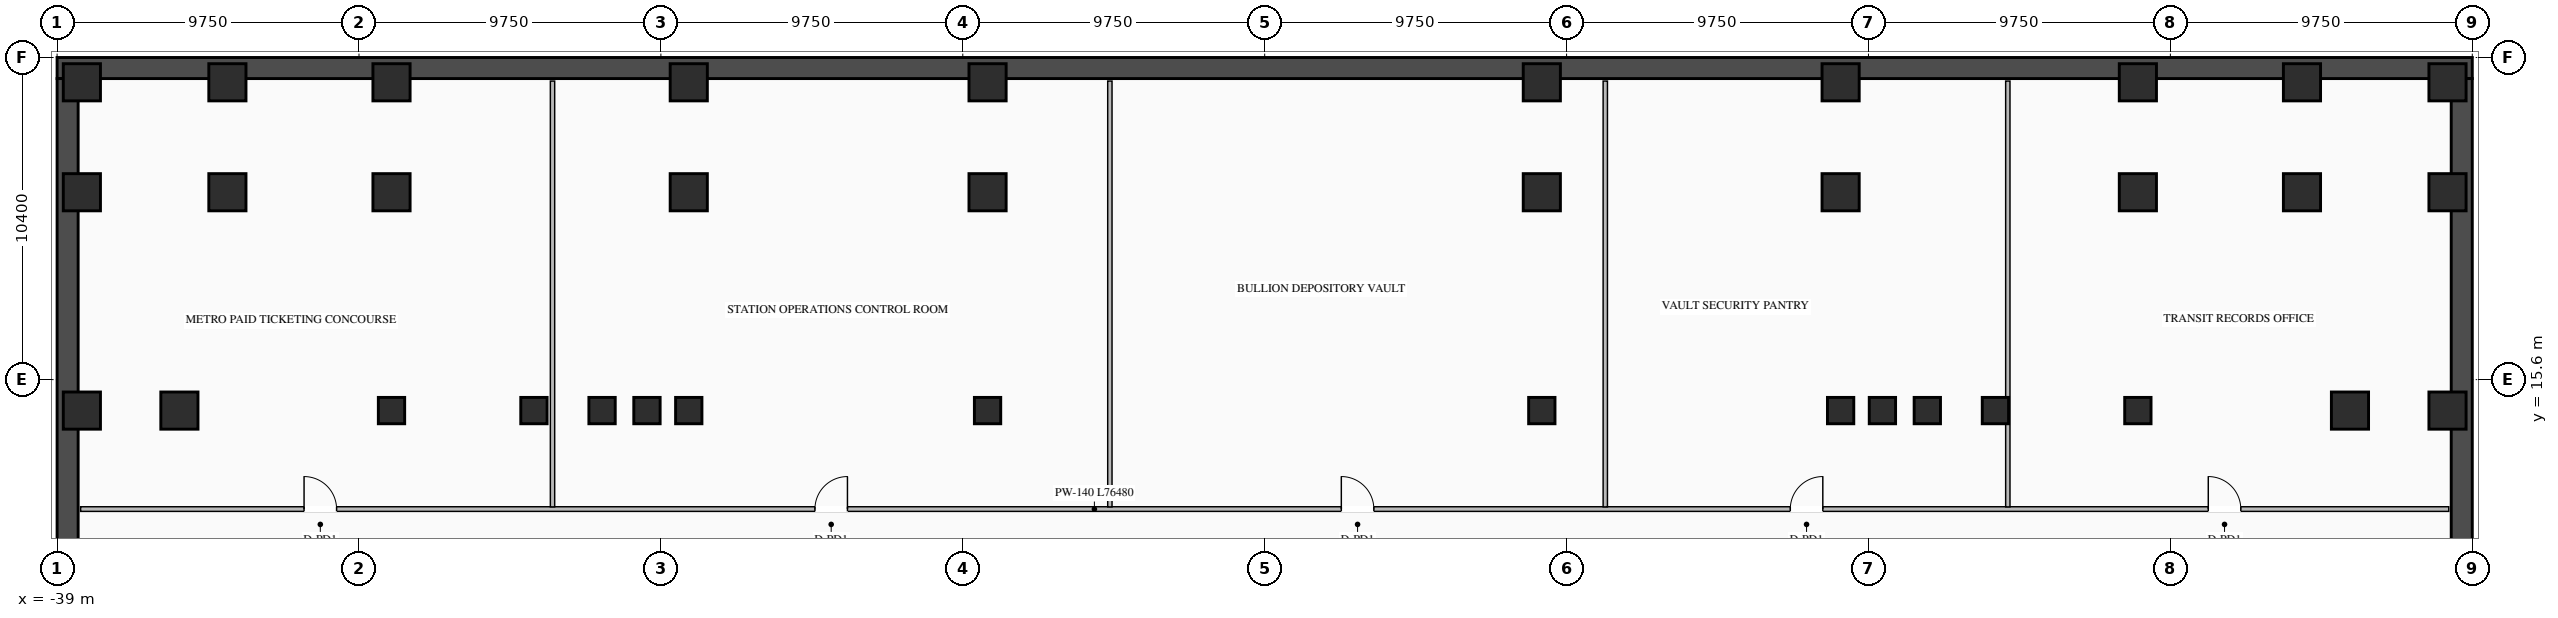
"""IFC4 building model, lengths in metres.
Left out: names, types, materials, properties, quantities, classifications, styles, units other than length and angle.
Written with IfcOpenShell. Run it as: python <this file> out.ifc"""

import sys

from ifc_helpers import new_model, si_unit, direction, frame, frame_2d, origin, origin_2d, place, context, subcontext, project, spatial, rectangle, i_section, extrude, element, fill, save


model = new_model("IFC4")
c1 = context("Model", 3, precision=1e-05, world=origin(), true_north=direction((0.0, 1.0)))
c2 = subcontext(c1, "Body", "Model", "MODEL_VIEW")
j1 = project(units=[si_unit("LENGTHUNIT", "METRE"), si_unit("PLANEANGLEUNIT", "RADIAN")], contexts=[c1])
p1 = place(None, origin())
s1 = spatial("IfcSite", under=j1, at=p1, CompositionType="ELEMENT")
p2 = place(p1, origin())
s2 = spatial("IfcBuilding", under=s1, at=p2, CompositionType="ELEMENT")
p3 = place(p2, frame((0.0, 0.0, -4.8)))
s3 = spatial("IfcBuildingStorey", under=s2, at=p3, CompositionType="ELEMENT", Elevation=-4.8)
p4 = place(p3, frame((39.0, 25.66, 0.0), z_axis=(0.0, 0.0, 1.0), x_axis=(-1.0, 0.0, 0.0)))
e1 = element("IfcWall", 1, at=p4, inside=s3, PredefinedType="SOLIDWALL", context=c2, shape_type="SweptSolid", body=[
    extrude(rectangle(XDim=78.0, YDim=0.68, at=frame_2d((39.0, 0.0))), origin(), (0.0, 0.0, 1.0), 4.45),
])
for number, where, z_axis, x_axis in (
    (2, (-38.66, -25.32, 0.0), (0.0, 0.0, 1.0), (0.0, 1.0, 0.0)),
    (3, (38.66, 25.32, 0.0), (0.0, 0.0, 1.0), (0.0, -1.0, 0.0)),
):
    element("IfcWall", number, at=place(p3, frame(where, z_axis=z_axis, x_axis=x_axis)), inside=s3, PredefinedType="SOLIDWALL", context=c2, shape_type="SweptSolid", body=[
        extrude(rectangle(XDim=50.64, YDim=0.68, at=frame_2d((25.32, 0.0))), origin(), (0.0, 0.0, 1.0), 4.45),
    ])
for number, where, z_axis, x_axis in (
    (4, (-21.4, 14.6, 0.0), (0.0, 0.0, 1.0), (1.0, 0.0, 0.0)),
    (5, (-19.95, 14.6, 0.0), (0.0, 0.0, 1.0), (1.0, 0.0, 0.0)),
    (6, (-18.6, 14.6, 0.0), (0.0, 0.0, 1.0), (1.0, 0.0, 0.0)),
    (7, (-8.95, 14.6, 0.0), (0.0, 0.0, 1.0), (1.0, 0.0, 0.0)),
    (8, (8.95, 14.6, 0.0), (0.0, 0.0, 1.0), (1.0, 0.0, 0.0)),
    (9, (18.6, 14.6, 0.0), (0.0, 0.0, 1.0), (1.0, 0.0, 0.0)),
    (10, (19.95, 14.6, 0.0), (0.0, 0.0, 1.0), (1.0, 0.0, 0.0)),
    (11, (21.4, 14.6, 0.0), (0.0, 0.0, 1.0), (1.0, 0.0, 0.0)),
    (12, (-23.6, 14.6, 0.0), (0.0, 0.0, 1.0), (1.0, 0.0, 0.0)),
    (13, (23.6, 14.6, 0.0), (0.0, 0.0, 1.0), (1.0, 0.0, 0.0)),
    (14, (-28.2, 14.6, 0.0), (0.0, 0.0, 1.0), (1.0, 0.0, 0.0)),
    (15, (28.2, 14.6, 0.0), (0.0, 0.0, 1.0), (1.0, 0.0, 0.0)),
):
    element("IfcColumn", number, at=place(p3, frame(where, z_axis=z_axis, x_axis=x_axis)), inside=s3, PredefinedType="COLUMN", context=c2, shape_type="SweptSolid", body=[
        extrude(i_section(OverallWidth=0.85, OverallDepth=0.85, WebThickness=0.032, FlangeThickness=0.048, at=origin_2d()), origin(), (0.0, 0.0, 1.0), 4.8),
    ])
for number, where, z_axis, x_axis in (
    (16, (-35.05, 14.6, 0.0), (0.0, 0.0, 1.0), (1.0, 0.0, 0.0)),
    (17, (35.05, 14.6, 0.0), (0.0, 0.0, 1.0), (1.0, 0.0, 0.0)),
    (18, (-38.2, 21.65, 0.0), (0.0, 0.0, 1.0), (1.0, 0.0, 0.0)),
    (19, (-33.5, 21.65, 0.0), (0.0, 0.0, 1.0), (1.0, 0.0, 0.0)),
    (20, (-28.2, 21.65, 0.0), (0.0, 0.0, 1.0), (1.0, 0.0, 0.0)),
    (21, (-18.6, 21.65, 0.0), (0.0, 0.0, 1.0), (1.0, 0.0, 0.0)),
    (22, (-8.95, 21.65, 0.0), (0.0, 0.0, 1.0), (1.0, 0.0, 0.0)),
    (23, (8.95, 21.65, 0.0), (0.0, 0.0, 1.0), (1.0, 0.0, 0.0)),
    (24, (18.6, 21.65, 0.0), (0.0, 0.0, 1.0), (1.0, 0.0, 0.0)),
    (25, (28.2, 21.65, 0.0), (0.0, 0.0, 1.0), (1.0, 0.0, 0.0)),
    (26, (33.5, 21.65, 0.0), (0.0, 0.0, 1.0), (1.0, 0.0, 0.0)),
    (27, (38.2, 21.65, 0.0), (0.0, 0.0, 1.0), (1.0, 0.0, 0.0)),
    (28, (-38.2, 25.2, 0.0), (0.0, 0.0, 1.0), (1.0, 0.0, 0.0)),
    (29, (-33.5, 25.2, 0.0), (0.0, 0.0, 1.0), (1.0, 0.0, 0.0)),
    (30, (-28.2, 25.2, 0.0), (0.0, 0.0, 1.0), (1.0, 0.0, 0.0)),
    (31, (-18.6, 25.2, 0.0), (0.0, 0.0, 1.0), (1.0, 0.0, 0.0)),
    (32, (-8.95, 25.2, 0.0), (0.0, 0.0, 1.0), (1.0, 0.0, 0.0)),
    (33, (8.95, 25.2, 0.0), (0.0, 0.0, 1.0), (1.0, 0.0, 0.0)),
    (34, (18.6, 25.2, 0.0), (0.0, 0.0, 1.0), (1.0, 0.0, 0.0)),
    (35, (28.2, 25.2, 0.0), (0.0, 0.0, 1.0), (1.0, 0.0, 0.0)),
    (36, (33.5, 25.2, 0.0), (0.0, 0.0, 1.0), (1.0, 0.0, 0.0)),
    (37, (38.2, 25.2, 0.0), (0.0, 0.0, 1.0), (1.0, 0.0, 0.0)),
    (38, (-38.2, 14.6, 0.0), (0.0, 0.0, 1.0), (1.0, 0.0, 0.0)),
    (39, (38.2, 14.6, 0.0), (0.0, 0.0, 1.0), (1.0, 0.0, 0.0)),
):
    element("IfcColumn", number, at=place(p3, frame(where, z_axis=z_axis, x_axis=x_axis)), inside=s3, PredefinedType="COLUMN", context=c2, shape_type="SweptSolid", body=[
        extrude(rectangle(XDim=1.2, YDim=1.2, at=origin_2d()), origin(), (0.0, 0.0, 1.0), 4.8),
    ])
p5 = place(p3, frame((-38.24, 11.42, 0.0), z_axis=(0.0, 0.0, 1.0), x_axis=(1.0, 0.0, 0.0)))
e40 = element("IfcWall", 40, at=p5, inside=s3, PredefinedType="STANDARD", context=c2, shape_type="SweptSolid", body=[
    extrude(rectangle(XDim=76.48, YDim=0.15, at=frame_2d((38.24, 0.0))), origin(), (0.0, 0.0, 1.0), 4.43),
])
p6 = place(p5, frame((7.216, 0.0, 0.0)))
e41 = element("IfcOpeningElement", 41, at=p6, cuts=e40, PredefinedType="OPENING", context=c2, shape_type="SweptSolid", body=[
    extrude(rectangle(XDim=1.05, YDim=2.08, at=frame_2d((0.525, 1.04))), frame((0.0, 0.085, 0.0), z_axis=(0.0, -1.0, 0.0), x_axis=(1.0, 0.0, 0.0)), (0.0, 0.0, 1.0), 0.17),
])
p7 = place(p5, frame((23.715, 0.0, 0.0)))
e42 = element("IfcOpeningElement", 42, at=p7, cuts=e40, PredefinedType="OPENING", context=c2, shape_type="SweptSolid", body=[
    extrude(rectangle(XDim=1.05, YDim=2.08, at=frame_2d((0.525, 1.04))), frame((0.0, 0.085, 0.0), z_axis=(0.0, -1.0, 0.0), x_axis=(1.0, 0.0, 0.0)), (0.0, 0.0, 1.0), 0.17),
])
p8 = place(p5, frame((40.715, 0.0, 0.0)))
e43 = element("IfcOpeningElement", 43, at=p8, cuts=e40, PredefinedType="OPENING", context=c2, shape_type="SweptSolid", body=[
    extrude(rectangle(XDim=1.05, YDim=2.08, at=frame_2d((0.525, 1.04))), frame((0.0, 0.085, 0.0), z_axis=(0.0, -1.0, 0.0), x_axis=(1.0, 0.0, 0.0)), (0.0, 0.0, 1.0), 0.17),
])
p9 = place(p5, frame((55.215, 0.0, 0.0)))
e44 = element("IfcOpeningElement", 44, at=p9, cuts=e40, PredefinedType="OPENING", context=c2, shape_type="SweptSolid", body=[
    extrude(rectangle(XDim=1.05, YDim=2.08, at=frame_2d((0.525, 1.04))), frame((0.0, 0.085, 0.0), z_axis=(0.0, -1.0, 0.0), x_axis=(1.0, 0.0, 0.0)), (0.0, 0.0, 1.0), 0.17),
])
p10 = place(p5, frame((68.714, 0.0, 0.0)))
e45 = element("IfcOpeningElement", 45, at=p10, cuts=e40, PredefinedType="OPENING", context=c2, shape_type="SweptSolid", body=[
    extrude(rectangle(XDim=1.05, YDim=2.08, at=frame_2d((0.525, 1.04))), frame((0.0, 0.085, 0.0), z_axis=(0.0, -1.0, 0.0), x_axis=(1.0, 0.0, 0.0)), (0.0, 0.0, 1.0), 0.17),
])
for number, where, z_axis, x_axis in (
    (46, (-23.0, 11.49, 0.0), (0.0, 0.0, 1.0), (0.0, 1.0, 0.0)),
    (47, (-5.0, 11.49, 0.0), (0.0, 0.0, 1.0), (0.0, 1.0, 0.0)),
    (48, (11.0, 11.49, 0.0), (0.0, 0.0, 1.0), (0.0, 1.0, 0.0)),
    (49, (24.0, 11.49, 0.0), (0.0, 0.0, 1.0), (0.0, 1.0, 0.0)),
):
    element("IfcWall", number, at=place(p3, frame(where, z_axis=z_axis, x_axis=x_axis)), inside=s3, PredefinedType="STANDARD", context=c2, shape_type="SweptSolid", body=[
        extrude(rectangle(XDim=13.75, YDim=0.14, at=frame_2d((6.875, 0.0))), origin(), (0.0, 0.0, 1.0), 4.43),
    ])
p11 = place(p6, origin())
e50 = element("IfcDoor", 50, at=p11, inside=s3, OperationType="SINGLE_SWING_LEFT", PredefinedType="DOOR", context=c2, shape_type="SweptSolid", body=[
    extrude(rectangle(XDim=1.05, YDim=2.08, at=frame_2d((0.525, 1.04))), frame((0.0, 0.025, 0.0), z_axis=(0.0, -1.0, 0.0), x_axis=(1.0, 0.0, 0.0)), (0.0, 0.0, 1.0), 0.05),
])
fill(e41, e50)
p12 = place(p7, origin())
e51 = element("IfcDoor", 51, at=p12, inside=s3, OperationType="SINGLE_SWING_RIGHT", PredefinedType="DOOR", context=c2, shape_type="SweptSolid", body=[
    extrude(rectangle(XDim=1.05, YDim=2.08, at=frame_2d((0.525, 1.04))), frame((0.0, 0.025, 0.0), z_axis=(0.0, -1.0, 0.0), x_axis=(1.0, 0.0, 0.0)), (0.0, 0.0, 1.0), 0.05),
])
fill(e42, e51)
p13 = place(p8, origin())
e52 = element("IfcDoor", 52, at=p13, inside=s3, OperationType="SINGLE_SWING_LEFT", PredefinedType="DOOR", context=c2, shape_type="SweptSolid", body=[
    extrude(rectangle(XDim=1.05, YDim=2.08, at=frame_2d((0.525, 1.04))), frame((0.0, 0.025, 0.0), z_axis=(0.0, -1.0, 0.0), x_axis=(1.0, 0.0, 0.0)), (0.0, 0.0, 1.0), 0.05),
])
fill(e43, e52)
p14 = place(p9, origin())
e53 = element("IfcDoor", 53, at=p14, inside=s3, OperationType="SINGLE_SWING_RIGHT", PredefinedType="DOOR", context=c2, shape_type="SweptSolid", body=[
    extrude(rectangle(XDim=1.05, YDim=2.08, at=frame_2d((0.525, 1.04))), frame((0.0, 0.025, 0.0), z_axis=(0.0, -1.0, 0.0), x_axis=(1.0, 0.0, 0.0)), (0.0, 0.0, 1.0), 0.05),
])
fill(e44, e53)
p15 = place(p10, origin())
e54 = element("IfcDoor", 54, at=p15, inside=s3, OperationType="SINGLE_SWING_LEFT", PredefinedType="DOOR", context=c2, shape_type="SweptSolid", body=[
    extrude(rectangle(XDim=1.05, YDim=2.08, at=frame_2d((0.525, 1.04))), frame((0.0, 0.025, 0.0), z_axis=(0.0, -1.0, 0.0), x_axis=(1.0, 0.0, 0.0)), (0.0, 0.0, 1.0), 0.05),
])
fill(e45, e54)
save(model, sys.argv[1])
